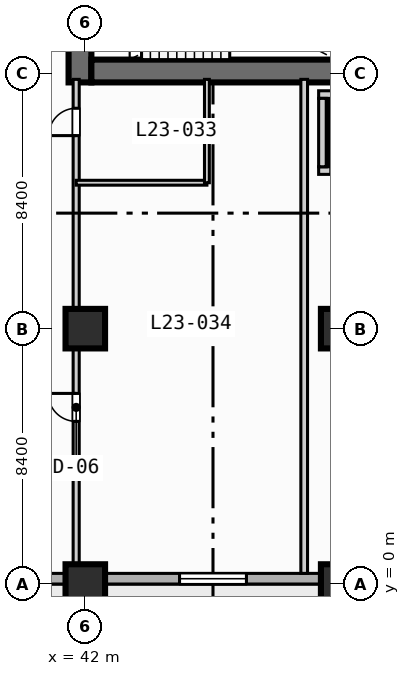
"""IFC4 building model, lengths in metres.
Left out: names, types, materials, properties, quantities, classifications, styles, units other than length and angle.
Written with IfcOpenShell. Run it as: python <this file> out.ifc"""

import sys

from ifc_helpers import new_model, si_unit, direction, frame, frame_2d, origin, origin_2d, place, context, subcontext, project, spatial, rectangle, extrude, element, fill, save


model = new_model("IFC4")
c1 = context("Model", 3, precision=1e-05, world=origin(), true_north=direction((0.0, 1.0)))
c2 = subcontext(c1, "Body", "Model", "MODEL_VIEW")
j1 = project(units=[si_unit("LENGTHUNIT", "METRE"), si_unit("PLANEANGLEUNIT", "RADIAN")], contexts=[c1])
p1 = place(None, origin())
s1 = spatial("IfcSite", under=j1, at=p1, CompositionType="ELEMENT")
p2 = place(p1, origin())
s2 = spatial("IfcBuilding", under=s1, at=p2, CompositionType="ELEMENT")
p3 = place(p2, frame((0.0, 0.0, 100.0)))
s3 = spatial("IfcBuildingStorey", under=s2, at=p3, CompositionType="ELEMENT", Elevation=100.0)
p4 = place(p3, frame((41.825, 16.5, 0.0), z_axis=(0.0, 0.0, 1.0), x_axis=(0.0, 1.0, 0.0)))
e1 = element("IfcWall", 1, at=p4, inside=s3, PredefinedType="SHEAR", context=c2, shape_type="SweptSolid", body=[
    extrude(rectangle(XDim=1.5, YDim=0.75, at=frame_2d((0.75, 0.0))), origin(), (0.0, 0.0, 1.0), 3.55),
])
p5 = place(p3, frame((42.2, 16.875, 0.0), z_axis=(0.0, 0.0, 1.0), x_axis=(1.0, 0.0, 0.0)))
e2 = element("IfcWall", 2, at=p5, inside=s3, PredefinedType="SHEAR", context=c2, shape_type="SweptSolid", body=[
    extrude(rectangle(XDim=16.35, YDim=0.75, at=frame_2d((8.175, 0.0))), origin(), (0.0, 0.0, 1.0), 3.55),
])
for number, where, z_axis, x_axis in (
    (3, (42.0, 0.0, 0.0), (0.0, 0.0, 1.0), (1.0, 0.0, 0.0)),
    (4, (42.0, 8.4, 0.0), (0.0, 0.0, 1.0), (1.0, 0.0, 0.0)),
    (5, (50.4, 0.0, 0.0), (0.0, 0.0, 1.0), (1.0, 0.0, 0.0)),
    (6, (50.4, 8.4, 0.0), (0.0, 0.0, 1.0), (1.0, 0.0, 0.0)),
):
    element("IfcColumn", number, at=place(p3, frame(where, z_axis=z_axis, x_axis=x_axis)), inside=s3, PredefinedType="COLUMN", context=c2, shape_type="SweptSolid", body=[
        extrude(rectangle(XDim=1.3, YDim=1.3, at=origin_2d()), origin(), (0.0, 0.0, 1.0), 3.8),
    ])
p6 = place(p3, frame((72.425, 0.175, 0.0), z_axis=(0.0, 0.0, 1.0), x_axis=(-1.0, 0.0, 0.0)))
e7 = element("IfcWall", 7, at=p6, inside=s3, PredefinedType="STANDARD", context=c2, shape_type="SweptSolid", body=[
    extrude(rectangle(XDim=69.25, YDim=0.35, at=frame_2d((34.625, 0.0))), origin(), (0.0, 0.0, 1.0), 3.55),
])
p7 = place(p6, frame((50.225, 0.0, 0.0)))
e8 = element("IfcOpeningElement", 8, at=p7, cuts=e7, PredefinedType="OPENING", context=c2, shape_type="SweptSolid", body=[
    extrude(rectangle(XDim=1.4, YDim=2.2, at=frame_2d((0.7, 1.1))), frame((0.0, 0.185, 0.0), z_axis=(0.0, -1.0, 0.0), x_axis=(1.0, 0.0, 0.0)), (0.0, 0.0, 1.0), 0.37),
])
p8 = place(p6, frame((33.525, 0.0, 0.85)))
e9 = element("IfcOpeningElement", 9, at=p8, cuts=e7, PredefinedType="OPENING", context=c2, shape_type="SweptSolid", body=[
    extrude(rectangle(XDim=2.2, YDim=1.8, at=frame_2d((1.1, 0.9))), frame((0.0, 0.185, 0.0), z_axis=(0.0, -1.0, 0.0), x_axis=(1.0, 0.0, 0.0)), (0.0, 0.0, 1.0), 0.37),
])
p9 = place(p6, frame((25.125, 0.0, 0.85)))
e10 = element("IfcOpeningElement", 10, at=p9, cuts=e7, PredefinedType="OPENING", context=c2, shape_type="SweptSolid", body=[
    extrude(rectangle(XDim=2.2, YDim=1.8, at=frame_2d((1.1, 0.9))), frame((0.0, 0.185, 0.0), z_axis=(0.0, -1.0, 0.0), x_axis=(1.0, 0.0, 0.0)), (0.0, 0.0, 1.0), 0.37),
])
p10 = place(p6, frame((8.325, 0.0, 0.85)))
e11 = element("IfcOpeningElement", 11, at=p10, cuts=e7, PredefinedType="OPENING", context=c2, shape_type="SweptSolid", body=[
    extrude(rectangle(XDim=2.2, YDim=1.8, at=frame_2d((1.1, 0.9))), frame((0.0, 0.185, 0.0), z_axis=(0.0, -1.0, 0.0), x_axis=(1.0, 0.0, 0.0)), (0.0, 0.0, 1.0), 0.37),
])
p11 = place(p6, frame((64.925, 0.0, 0.85)))
e12 = element("IfcOpeningElement", 12, at=p11, cuts=e7, PredefinedType="OPENING", context=c2, shape_type="SweptSolid", body=[
    extrude(rectangle(XDim=1.8, YDim=1.8, at=frame_2d((0.9, 0.9))), frame((0.0, 0.185, 0.0), z_axis=(0.0, -1.0, 0.0), x_axis=(1.0, 0.0, 0.0)), (0.0, 0.0, 1.0), 0.37),
])
p12 = place(p6, frame((56.525, 0.0, 0.85)))
e13 = element("IfcOpeningElement", 13, at=p12, cuts=e7, PredefinedType="OPENING", context=c2, shape_type="SweptSolid", body=[
    extrude(rectangle(XDim=1.8, YDim=1.8, at=frame_2d((0.9, 0.9))), frame((0.0, 0.185, 0.0), z_axis=(0.0, -1.0, 0.0), x_axis=(1.0, 0.0, 0.0)), (0.0, 0.0, 1.0), 0.37),
])
p13 = place(p6, frame((2.125, 0.0, 0.85)))
e14 = element("IfcOpeningElement", 14, at=p13, cuts=e7, PredefinedType="OPENING", context=c2, shape_type="SweptSolid", body=[
    extrude(rectangle(XDim=1.8, YDim=1.8, at=frame_2d((0.9, 0.9))), frame((0.0, 0.185, 0.0), z_axis=(0.0, -1.0, 0.0), x_axis=(1.0, 0.0, 0.0)), (0.0, 0.0, 1.0), 0.37),
])
p14 = place(p3, frame((49.675, 13.6, 0.0), z_axis=(0.0, 0.0, 1.0), x_axis=(1.0, 0.0, 0.0)))
e15 = element("IfcWall", 15, at=p14, inside=s3, PredefinedType="SOLIDWALL", context=c2, shape_type="SweptSolid", body=[
    extrude(rectangle(XDim=2.25, YDim=0.25, at=frame_2d((1.125, 0.0))), origin(), (0.0, 0.0, 1.0), 3.55),
])
p15 = place(p14, frame((0.4, 0.0, 0.0)))
e16 = element("IfcOpeningElement", 16, at=p15, cuts=e15, PredefinedType="OPENING", context=c2, shape_type="SweptSolid", body=[
    extrude(rectangle(XDim=1.1, YDim=2.15, at=frame_2d((0.55, 1.075))), frame((0.0, 0.135, 0.0), z_axis=(0.0, -1.0, 0.0), x_axis=(1.0, 0.0, 0.0)), (0.0, 0.0, 1.0), 0.27),
])
for number, where, z_axis, x_axis in (
    (17, (49.675, 16.1, 0.0), (0.0, 0.0, 1.0), (1.0, 0.0, 0.0)),
    (18, (49.8, 13.725, 0.0), (0.0, 0.0, 1.0), (0.0, 1.0, 0.0)),
):
    element("IfcWall", number, at=place(p3, frame(where, z_axis=z_axis, x_axis=x_axis)), inside=s3, PredefinedType="SOLIDWALL", context=c2, shape_type="SweptSolid", body=[
        extrude(rectangle(XDim=2.25, YDim=0.25, at=frame_2d((1.125, 0.0))), origin(), (0.0, 0.0, 1.0), 3.55),
    ])
p16 = place(p3, frame((41.7, 0.35, 0.0), z_axis=(0.0, 0.0, 1.0), x_axis=(0.0, 1.0, 0.0)))
e19 = element("IfcWall", 19, at=p16, inside=s3, PredefinedType="PARTITIONING", context=c2, shape_type="SweptSolid", body=[
    extrude(rectangle(XDim=16.25, YDim=0.2, at=frame_2d((8.125, 0.0))), origin(), (0.0, 0.0, 1.0), 2.8),
])
p17 = place(p16, frame((5.0, 0.0, 0.0)))
e20 = element("IfcOpeningElement", 20, at=p17, cuts=e19, PredefinedType="OPENING", context=c2, shape_type="SweptSolid", body=[
    extrude(rectangle(XDim=0.92, YDim=2.1, at=frame_2d((0.46, 1.05))), frame((0.0, 0.11, 0.0), z_axis=(0.0, -1.0, 0.0), x_axis=(1.0, 0.0, 0.0)), (0.0, 0.0, 1.0), 0.22),
])
p18 = place(p16, frame((14.4, 0.0, 0.0)))
e21 = element("IfcOpeningElement", 21, at=p18, cuts=e19, PredefinedType="OPENING", context=c2, shape_type="SweptSolid", body=[
    extrude(rectangle(XDim=0.9, YDim=2.1, at=frame_2d((0.45, 1.05))), frame((0.0, 0.11, 0.0), z_axis=(0.0, -1.0, 0.0), x_axis=(1.0, 0.0, 0.0)), (0.0, 0.0, 1.0), 0.22),
])
p19 = place(p3, frame((49.2, 0.35, 0.0), z_axis=(0.0, 0.0, 1.0), x_axis=(0.0, 1.0, 0.0)))
e22 = element("IfcWall", 22, at=p19, inside=s3, PredefinedType="PARTITIONING", context=c2, shape_type="SweptSolid", body=[
    extrude(rectangle(XDim=16.25, YDim=0.22, at=frame_2d((8.125, 0.0))), origin(), (0.0, 0.0, 1.0), 3.55),
])
p20 = place(p3, frame((41.7, 13.2, 0.0), z_axis=(0.0, 0.0, 1.0), x_axis=(1.0, 0.0, 0.0)))
e23 = element("IfcWall", 23, at=p20, inside=s3, PredefinedType="PARTITIONING", context=c2, shape_type="SweptSolid", body=[
    extrude(rectangle(XDim=4.3, YDim=0.16, at=frame_2d((2.15, 0.0))), origin(), (0.0, 0.0, 1.0), 3.55),
])
p21 = place(p3, frame((46.0, 13.2, 0.0), z_axis=(0.0, 0.0, 1.0), x_axis=(0.0, 1.0, 0.0)))
e24 = element("IfcWall", 24, at=p21, inside=s3, PredefinedType="PARTITIONING", context=c2, shape_type="SweptSolid", body=[
    extrude(rectangle(XDim=3.4, YDim=0.16, at=frame_2d((1.7, 0.0))), origin(), (0.0, 0.0, 1.0), 3.55),
])
p22 = place(p9, origin())
e25 = element("IfcWindow", 25, at=p22, inside=s3, PartitioningType="SINGLE_PANEL", PredefinedType="WINDOW", context=c2, shape_type="SweptSolid", body=[
    extrude(rectangle(XDim=2.2, YDim=1.8, at=frame_2d((1.1, 0.9))), frame((0.0, 0.03, 0.0), z_axis=(0.0, -1.0, 0.0), x_axis=(1.0, 0.0, 0.0)), (0.0, 0.0, 1.0), 0.06),
])
fill(e10, e25)
p23 = place(p17, origin())
e26 = element("IfcDoor", 26, at=p23, inside=s3, OperationType="SINGLE_SWING_RIGHT", PredefinedType="DOOR", context=c2, shape_type="SweptSolid", body=[
    extrude(rectangle(XDim=0.92, YDim=2.1, at=frame_2d((0.46, 1.05))), frame((0.0, 0.025, 0.0), z_axis=(0.0, -1.0, 0.0), x_axis=(1.0, 0.0, 0.0)), (0.0, 0.0, 1.0), 0.05),
])
fill(e20, e26)
p24 = place(p18, origin())
e27 = element("IfcDoor", 27, at=p24, inside=s3, OperationType="SINGLE_SWING_LEFT", PredefinedType="DOOR", context=c2, shape_type="SweptSolid", body=[
    extrude(rectangle(XDim=0.9, YDim=2.1, at=frame_2d((0.45, 1.05))), frame((0.0, 0.025, 0.0), z_axis=(0.0, -1.0, 0.0), x_axis=(1.0, 0.0, 0.0)), (0.0, 0.0, 1.0), 0.05),
])
fill(e21, e27)
save(model, sys.argv[1])
